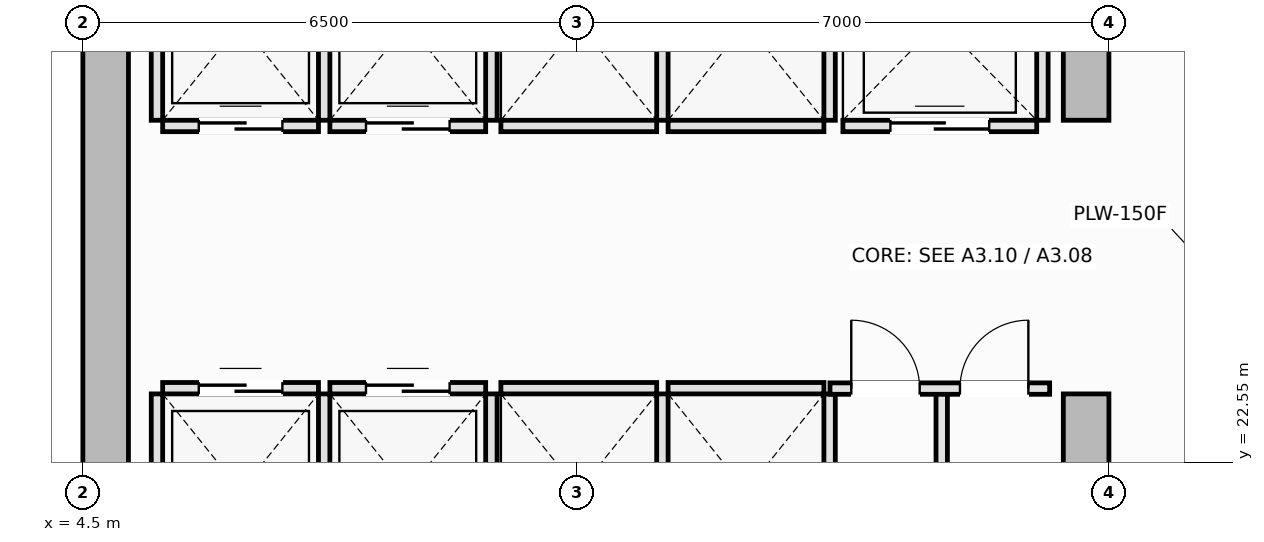
"""IFC4 building model, lengths in metres.
Left out: names, types, materials, properties, quantities, classifications, styles, units other than length and angle.
Written with IfcOpenShell. Run it as: python <this file> out.ifc"""

import sys

from ifc_helpers import new_model, si_unit, direction, frame, frame_2d, origin, place, context, subcontext, project, spatial, rectangle, extrude, element, fill, save


model = new_model("IFC4")
c1 = context("Model", 3, precision=1e-05, world=origin(), true_north=direction((0.0, 1.0)))
c2 = subcontext(c1, "Body", "Model", "MODEL_VIEW")
j1 = project(units=[si_unit("LENGTHUNIT", "METRE"), si_unit("PLANEANGLEUNIT", "RADIAN")], contexts=[c1])
p1 = place(None, origin())
s1 = spatial("IfcSite", under=j1, at=p1, CompositionType="ELEMENT")
p2 = place(p1, origin())
s2 = spatial("IfcBuilding", under=s1, at=p2, CompositionType="ELEMENT")
p3 = place(p2, frame((0.0, 0.0, 137.75)))
s3 = spatial("IfcBuildingStorey", under=s2, at=p3, CompositionType="ELEMENT", Elevation=137.75)
p4 = place(p3, frame((4.8, 14.6, 0.0), z_axis=(0.0, 0.0, 1.0), x_axis=(0.0, 1.0, 0.0)))
e1 = element("IfcWall", 1, at=p4, inside=s3, PredefinedType="SHEAR", context=c2, shape_type="SweptSolid", body=[
    extrude(rectangle(XDim=21.3, YDim=0.6, at=frame_2d((10.65, 0.0))), origin(), (0.0, 0.0, 1.0), 3.55),
])
p5 = place(p3, frame((17.7, 14.6, 0.0), z_axis=(0.0, 0.0, 1.0), x_axis=(0.0, 1.0, 0.0)))
e2 = element("IfcWall", 2, at=p5, inside=s3, PredefinedType="SHEAR", context=c2, shape_type="SweptSolid", body=[
    extrude(rectangle(XDim=8.85, YDim=0.6, at=frame_2d((4.425, 0.0))), origin(), (0.0, 0.0, 1.0), 3.55),
])
p6 = place(p5, frame((4.3, 0.0, 0.0)))
e3 = element("IfcOpeningElement", 3, at=p6, cuts=e2, PredefinedType="OPENING", context=c2, shape_type="SweptSolid", body=[
    extrude(rectangle(XDim=1.1, YDim=2.15, at=frame_2d((0.55, 1.075))), frame((0.0, 0.31, 0.0), z_axis=(0.0, -1.0, 0.0), x_axis=(1.0, 0.0, 0.0)), (0.0, 0.0, 1.0), 0.62),
])
p7 = place(p3, frame((17.7, 27.05, 0.0), z_axis=(0.0, 0.0, 1.0), x_axis=(0.0, 1.0, 0.0)))
e4 = element("IfcWall", 4, at=p7, inside=s3, PredefinedType="SHEAR", context=c2, shape_type="SweptSolid", body=[
    extrude(rectangle(XDim=8.85, YDim=0.6, at=frame_2d((4.425, 0.0))), origin(), (0.0, 0.0, 1.0), 3.55),
])
p8 = place(p7, frame((3.45, 0.0, 0.0)))
e5 = element("IfcOpeningElement", 5, at=p8, cuts=e4, PredefinedType="OPENING", context=c2, shape_type="SweptSolid", body=[
    extrude(rectangle(XDim=1.1, YDim=2.15, at=frame_2d((0.55, 1.075))), frame((0.0, 0.31, 0.0), z_axis=(0.0, -1.0, 0.0), x_axis=(1.0, 0.0, 0.0)), (0.0, 0.0, 1.0), 0.62),
])
p9 = place(p3, frame((5.55, 23.525, 0.0), z_axis=(0.0, 0.0, 1.0), x_axis=(1.0, 0.0, 0.0)))
e6 = element("IfcWall", 6, at=p9, inside=s3, PredefinedType="PARTITIONING", context=c2, shape_type="SweptSolid", body=[
    extrude(rectangle(XDim=2.05, YDim=0.15, at=frame_2d((1.025, 0.0))), origin(), (0.0, 0.0, 1.0), 3.37),
])
p10 = place(p9, frame((0.475, 0.0, 0.0)))
e7 = element("IfcOpeningElement", 7, at=p10, cuts=e6, PredefinedType="OPENING", context=c2, shape_type="SweptSolid", body=[
    extrude(rectangle(XDim=1.1, YDim=2.2, at=frame_2d((0.55, 1.1))), frame((0.0, 0.085, 0.0), z_axis=(0.0, -1.0, 0.0), x_axis=(1.0, 0.0, 0.0)), (0.0, 0.0, 1.0), 0.17),
])
for number, where, z_axis, x_axis in (
    (8, (5.475, 20.9, 0.0), (0.0, 0.0, 1.0), (0.0, 1.0, 0.0)),
    (9, (7.675, 20.9, 0.0), (0.0, 0.0, 1.0), (0.0, 1.0, 0.0)),
):
    element("IfcWall", number, at=place(p3, frame(where, z_axis=z_axis, x_axis=x_axis)), inside=s3, PredefinedType="PARTITIONING", context=c2, shape_type="SweptSolid", body=[
        extrude(rectangle(XDim=2.55, YDim=0.15, at=frame_2d((1.275, 0.0))), origin(), (0.0, 0.0, 1.0), 3.37),
    ])
p11 = place(p3, frame((7.75, 23.525, 0.0), z_axis=(0.0, 0.0, 1.0), x_axis=(1.0, 0.0, 0.0)))
e10 = element("IfcWall", 10, at=p11, inside=s3, PredefinedType="PARTITIONING", context=c2, shape_type="SweptSolid", body=[
    extrude(rectangle(XDim=2.05, YDim=0.15, at=frame_2d((1.025, 0.0))), origin(), (0.0, 0.0, 1.0), 3.37),
])
p12 = place(p11, frame((0.475, 0.0, 0.0)))
e11 = element("IfcOpeningElement", 11, at=p12, cuts=e10, PredefinedType="OPENING", context=c2, shape_type="SweptSolid", body=[
    extrude(rectangle(XDim=1.1, YDim=2.2, at=frame_2d((0.55, 1.1))), frame((0.0, 0.085, 0.0), z_axis=(0.0, -1.0, 0.0), x_axis=(1.0, 0.0, 0.0)), (0.0, 0.0, 1.0), 0.17),
])
p13 = place(p3, frame((9.875, 20.9, 0.0), z_axis=(0.0, 0.0, 1.0), x_axis=(0.0, 1.0, 0.0)))
e12 = element("IfcWall", 12, at=p13, inside=s3, PredefinedType="PARTITIONING", context=c2, shape_type="SweptSolid", body=[
    extrude(rectangle(XDim=2.55, YDim=0.15, at=frame_2d((1.275, 0.0))), origin(), (0.0, 0.0, 1.0), 3.37),
])
p14 = place(p3, frame((5.55, 26.975, 0.0), z_axis=(0.0, 0.0, 1.0), x_axis=(1.0, 0.0, 0.0)))
e13 = element("IfcWall", 13, at=p14, inside=s3, PredefinedType="PARTITIONING", context=c2, shape_type="SweptSolid", body=[
    extrude(rectangle(XDim=2.05, YDim=0.15, at=frame_2d((1.025, 0.0))), origin(), (0.0, 0.0, 1.0), 3.37),
])
p15 = place(p14, frame((0.475, 0.0, 0.0)))
e14 = element("IfcOpeningElement", 14, at=p15, cuts=e13, PredefinedType="OPENING", context=c2, shape_type="SweptSolid", body=[
    extrude(rectangle(XDim=1.1, YDim=2.2, at=frame_2d((0.55, 1.1))), frame((0.0, 0.085, 0.0), z_axis=(0.0, -1.0, 0.0), x_axis=(1.0, 0.0, 0.0)), (0.0, 0.0, 1.0), 0.17),
])
for number, where, z_axis, x_axis in (
    (15, (5.475, 27.05, 0.0), (0.0, 0.0, 1.0), (0.0, 1.0, 0.0)),
    (16, (7.675, 27.05, 0.0), (0.0, 0.0, 1.0), (0.0, 1.0, 0.0)),
):
    element("IfcWall", number, at=place(p3, frame(where, z_axis=z_axis, x_axis=x_axis)), inside=s3, PredefinedType="PARTITIONING", context=c2, shape_type="SweptSolid", body=[
        extrude(rectangle(XDim=2.55, YDim=0.15, at=frame_2d((1.275, 0.0))), origin(), (0.0, 0.0, 1.0), 3.37),
    ])
p16 = place(p3, frame((7.75, 26.975, 0.0), z_axis=(0.0, 0.0, 1.0), x_axis=(1.0, 0.0, 0.0)))
e17 = element("IfcWall", 17, at=p16, inside=s3, PredefinedType="PARTITIONING", context=c2, shape_type="SweptSolid", body=[
    extrude(rectangle(XDim=2.05, YDim=0.15, at=frame_2d((1.025, 0.0))), origin(), (0.0, 0.0, 1.0), 3.37),
])
p17 = place(p16, frame((0.475, 0.0, 0.0)))
e18 = element("IfcOpeningElement", 18, at=p17, cuts=e17, PredefinedType="OPENING", context=c2, shape_type="SweptSolid", body=[
    extrude(rectangle(XDim=1.1, YDim=2.2, at=frame_2d((0.55, 1.1))), frame((0.0, 0.085, 0.0), z_axis=(0.0, -1.0, 0.0), x_axis=(1.0, 0.0, 0.0)), (0.0, 0.0, 1.0), 0.17),
])
p18 = place(p3, frame((9.875, 27.05, 0.0), z_axis=(0.0, 0.0, 1.0), x_axis=(0.0, 1.0, 0.0)))
e19 = element("IfcWall", 19, at=p18, inside=s3, PredefinedType="PARTITIONING", context=c2, shape_type="SweptSolid", body=[
    extrude(rectangle(XDim=2.55, YDim=0.15, at=frame_2d((1.275, 0.0))), origin(), (0.0, 0.0, 1.0), 3.37),
])
p19 = place(p3, frame((10.0, 23.525, 0.0), z_axis=(0.0, 0.0, 1.0), x_axis=(1.0, 0.0, 0.0)))
e20 = element("IfcWall", 20, at=p19, inside=s3, PredefinedType="PARTITIONING", context=c2, shape_type="SweptSolid", body=[
    extrude(rectangle(XDim=2.05, YDim=0.15, at=frame_2d((1.025, 0.0))), origin(), (0.0, 0.0, 1.0), 3.37),
])
p20 = place(p3, frame((12.125, 20.9, 0.0), z_axis=(0.0, 0.0, 1.0), x_axis=(0.0, 1.0, 0.0)))
e21 = element("IfcWall", 21, at=p20, inside=s3, PredefinedType="PARTITIONING", context=c2, shape_type="SweptSolid", body=[
    extrude(rectangle(XDim=2.55, YDim=0.15, at=frame_2d((1.275, 0.0))), origin(), (0.0, 0.0, 1.0), 3.37),
])
p21 = place(p3, frame((12.2, 23.525, 0.0), z_axis=(0.0, 0.0, 1.0), x_axis=(1.0, 0.0, 0.0)))
e22 = element("IfcWall", 22, at=p21, inside=s3, PredefinedType="PARTITIONING", context=c2, shape_type="SweptSolid", body=[
    extrude(rectangle(XDim=2.05, YDim=0.15, at=frame_2d((1.025, 0.0))), origin(), (0.0, 0.0, 1.0), 3.37),
])
p22 = place(p3, frame((14.325, 20.9, 0.0), z_axis=(0.0, 0.0, 1.0), x_axis=(0.0, 1.0, 0.0)))
e23 = element("IfcWall", 23, at=p22, inside=s3, PredefinedType="PARTITIONING", context=c2, shape_type="SweptSolid", body=[
    extrude(rectangle(XDim=2.55, YDim=0.15, at=frame_2d((1.275, 0.0))), origin(), (0.0, 0.0, 1.0), 3.37),
])
p23 = place(p3, frame((10.0, 26.975, 0.0), z_axis=(0.0, 0.0, 1.0), x_axis=(1.0, 0.0, 0.0)))
e24 = element("IfcWall", 24, at=p23, inside=s3, PredefinedType="PARTITIONING", context=c2, shape_type="SweptSolid", body=[
    extrude(rectangle(XDim=2.05, YDim=0.15, at=frame_2d((1.025, 0.0))), origin(), (0.0, 0.0, 1.0), 3.37),
])
p24 = place(p3, frame((12.125, 27.05, 0.0), z_axis=(0.0, 0.0, 1.0), x_axis=(0.0, 1.0, 0.0)))
e25 = element("IfcWall", 25, at=p24, inside=s3, PredefinedType="PARTITIONING", context=c2, shape_type="SweptSolid", body=[
    extrude(rectangle(XDim=2.55, YDim=0.15, at=frame_2d((1.275, 0.0))), origin(), (0.0, 0.0, 1.0), 3.37),
])
p25 = place(p3, frame((12.2, 26.975, 0.0), z_axis=(0.0, 0.0, 1.0), x_axis=(1.0, 0.0, 0.0)))
e26 = element("IfcWall", 26, at=p25, inside=s3, PredefinedType="PARTITIONING", context=c2, shape_type="SweptSolid", body=[
    extrude(rectangle(XDim=2.05, YDim=0.15, at=frame_2d((1.025, 0.0))), origin(), (0.0, 0.0, 1.0), 3.37),
])
p26 = place(p3, frame((14.325, 27.05, 0.0), z_axis=(0.0, 0.0, 1.0), x_axis=(0.0, 1.0, 0.0)))
e27 = element("IfcWall", 27, at=p26, inside=s3, PredefinedType="PARTITIONING", context=c2, shape_type="SweptSolid", body=[
    extrude(rectangle(XDim=2.55, YDim=0.15, at=frame_2d((1.275, 0.0))), origin(), (0.0, 0.0, 1.0), 3.37),
])
p27 = place(p3, frame((14.5, 26.975, 0.0), z_axis=(0.0, 0.0, 1.0), x_axis=(1.0, 0.0, 0.0)))
e28 = element("IfcWall", 28, at=p27, inside=s3, PredefinedType="PARTITIONING", context=c2, shape_type="SweptSolid", body=[
    extrude(rectangle(XDim=2.55, YDim=0.15, at=frame_2d((1.275, 0.0))), origin(), (0.0, 0.0, 1.0), 3.37),
])
p28 = place(p27, frame((0.625, 0.0, 0.0)))
e29 = element("IfcOpeningElement", 29, at=p28, cuts=e28, PredefinedType="OPENING", context=c2, shape_type="SweptSolid", body=[
    extrude(rectangle(XDim=1.3, YDim=2.2, at=frame_2d((0.65, 1.1))), frame((0.0, 0.085, 0.0), z_axis=(0.0, -1.0, 0.0), x_axis=(1.0, 0.0, 0.0)), (0.0, 0.0, 1.0), 0.17),
])
p29 = place(p3, frame((17.125, 27.05, 0.0), z_axis=(0.0, 0.0, 1.0), x_axis=(0.0, 1.0, 0.0)))
e30 = element("IfcWall", 30, at=p29, inside=s3, PredefinedType="PARTITIONING", context=c2, shape_type="SweptSolid", body=[
    extrude(rectangle(XDim=2.6, YDim=0.15, at=frame_2d((1.3, 0.0))), origin(), (0.0, 0.0, 1.0), 3.37),
])
p30 = place(p3, frame((15.8, 20.85, 0.0), z_axis=(0.0, 0.0, 1.0), x_axis=(0.0, 1.0, 0.0)))
e31 = element("IfcWall", 31, at=p30, inside=s3, PredefinedType="PARTITIONING", context=c2, shape_type="SweptSolid", body=[
    extrude(rectangle(XDim=2.67, YDim=0.15, at=frame_2d((1.335, 0.0))), origin(), (0.0, 0.0, 1.0), 3.37),
])
p31 = place(p3, frame((14.33, 23.52, 0.0), z_axis=(0.0, 0.0, 1.0), x_axis=(1.0, 0.0, 0.0)))
e32 = element("IfcWall", 32, at=p31, inside=s3, PredefinedType="PARTITIONING", context=c2, shape_type="SweptSolid", body=[
    extrude(rectangle(XDim=2.89, YDim=0.15, at=frame_2d((1.445, 0.0))), origin(), (0.0, 0.0, 1.0), 3.37),
])
p32 = place(p31, frame((0.28, 0.0, 0.0)))
e33 = element("IfcOpeningElement", 33, at=p32, cuts=e32, PredefinedType="OPENING", context=c2, shape_type="SweptSolid", body=[
    extrude(rectangle(XDim=0.9, YDim=2.1, at=frame_2d((0.45, 1.05))), frame((0.0, 0.085, 0.0), z_axis=(0.0, -1.0, 0.0), x_axis=(1.0, 0.0, 0.0)), (0.0, 0.0, 1.0), 0.17),
])
p33 = place(p31, frame((1.71, 0.0, 0.0)))
e34 = element("IfcOpeningElement", 34, at=p33, cuts=e32, PredefinedType="OPENING", context=c2, shape_type="SweptSolid", body=[
    extrude(rectangle(XDim=0.9, YDim=2.1, at=frame_2d((0.45, 1.05))), frame((0.0, 0.085, 0.0), z_axis=(0.0, -1.0, 0.0), x_axis=(1.0, 0.0, 0.0)), (0.0, 0.0, 1.0), 0.17),
])
p34 = place(p10, origin())
e35 = element("IfcDoor", 35, at=p34, inside=s3, OperationType="DOUBLE_DOOR_SLIDING", PredefinedType="DOOR", context=c2, shape_type="SweptSolid", body=[
    extrude(rectangle(XDim=1.1, YDim=2.2, at=frame_2d((0.55, 1.1))), frame((0.0, 0.025, 0.0), z_axis=(0.0, -1.0, 0.0), x_axis=(1.0, 0.0, 0.0)), (0.0, 0.0, 1.0), 0.05),
])
fill(e7, e35)
p35 = place(p12, origin())
e36 = element("IfcDoor", 36, at=p35, inside=s3, OperationType="DOUBLE_DOOR_SLIDING", PredefinedType="DOOR", context=c2, shape_type="SweptSolid", body=[
    extrude(rectangle(XDim=1.1, YDim=2.2, at=frame_2d((0.55, 1.1))), frame((0.0, 0.025, 0.0), z_axis=(0.0, -1.0, 0.0), x_axis=(1.0, 0.0, 0.0)), (0.0, 0.0, 1.0), 0.05),
])
fill(e11, e36)
p36 = place(p15, origin())
e37 = element("IfcDoor", 37, at=p36, inside=s3, OperationType="DOUBLE_DOOR_SLIDING", PredefinedType="DOOR", context=c2, shape_type="SweptSolid", body=[
    extrude(rectangle(XDim=1.1, YDim=2.2, at=frame_2d((0.55, 1.1))), frame((0.0, 0.025, 0.0), z_axis=(0.0, -1.0, 0.0), x_axis=(1.0, 0.0, 0.0)), (0.0, 0.0, 1.0), 0.05),
])
fill(e14, e37)
p37 = place(p17, origin())
e38 = element("IfcDoor", 38, at=p37, inside=s3, OperationType="DOUBLE_DOOR_SLIDING", PredefinedType="DOOR", context=c2, shape_type="SweptSolid", body=[
    extrude(rectangle(XDim=1.1, YDim=2.2, at=frame_2d((0.55, 1.1))), frame((0.0, 0.025, 0.0), z_axis=(0.0, -1.0, 0.0), x_axis=(1.0, 0.0, 0.0)), (0.0, 0.0, 1.0), 0.05),
])
fill(e18, e38)
p38 = place(p28, origin())
e39 = element("IfcDoor", 39, at=p38, inside=s3, OperationType="DOUBLE_DOOR_SLIDING", PredefinedType="DOOR", context=c2, shape_type="SweptSolid", body=[
    extrude(rectangle(XDim=1.3, YDim=2.2, at=frame_2d((0.65, 1.1))), frame((0.0, 0.025, 0.0), z_axis=(0.0, -1.0, 0.0), x_axis=(1.0, 0.0, 0.0)), (0.0, 0.0, 1.0), 0.05),
])
fill(e29, e39)
p39 = place(p32, origin())
e40 = element("IfcDoor", 40, at=p39, inside=s3, OperationType="SINGLE_SWING_LEFT", PredefinedType="DOOR", context=c2, shape_type="SweptSolid", body=[
    extrude(rectangle(XDim=0.9, YDim=2.1, at=frame_2d((0.45, 1.05))), frame((0.0, 0.025, 0.0), z_axis=(0.0, -1.0, 0.0), x_axis=(1.0, 0.0, 0.0)), (0.0, 0.0, 1.0), 0.05),
])
fill(e33, e40)
p40 = place(p33, origin())
e41 = element("IfcDoor", 41, at=p40, inside=s3, OperationType="SINGLE_SWING_RIGHT", PredefinedType="DOOR", context=c2, shape_type="SweptSolid", body=[
    extrude(rectangle(XDim=0.9, YDim=2.1, at=frame_2d((0.45, 1.05))), frame((0.0, 0.025, 0.0), z_axis=(0.0, -1.0, 0.0), x_axis=(1.0, 0.0, 0.0)), (0.0, 0.0, 1.0), 0.05),
])
fill(e34, e41)
save(model, sys.argv[1])
